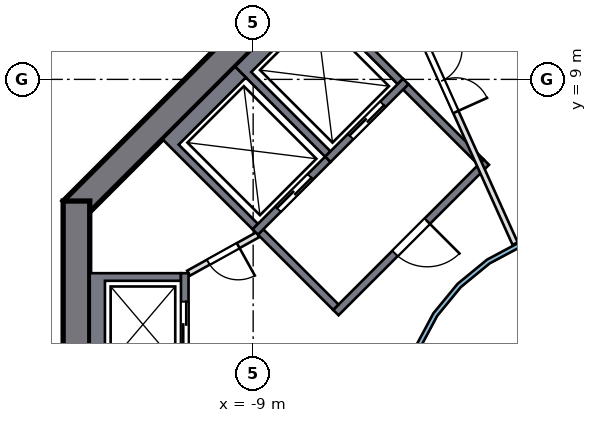
"""IFC4 building model, lengths in metres.
Left out: names, types, materials, properties, quantities, classifications, styles, units other than length and angle.
Written with IfcOpenShell. Run it as: python <this file> out.ifc"""

import sys

from ifc_helpers import new_model, si_unit, direction, frame, frame_2d, origin, place, context, subcontext, project, spatial, polyline, rectangle, outline, extrude, element, fill, save


model = new_model("IFC4")
c1 = context("Model", 3, precision=1e-05, world=origin(), true_north=direction((0.0, 1.0)))
c2 = subcontext(c1, "Body", "Model", "MODEL_VIEW")
j1 = project(units=[si_unit("LENGTHUNIT", "METRE"), si_unit("PLANEANGLEUNIT", "RADIAN")], contexts=[c1])
p1 = place(None, origin())
s1 = spatial("IfcSite", under=j1, at=p1, CompositionType="ELEMENT")
p2 = place(p1, origin())
s2 = spatial("IfcBuilding", under=s1, at=p2, CompositionType="ELEMENT")
p3 = place(p2, frame((0.0, 0.0, 154.0)))
s3 = spatial("IfcBuildingStorey", under=s2, at=p3, CompositionType="ELEMENT", Elevation=154.0)
p4 = place(p3, frame((-5.552, 13.752, 0.0), z_axis=(0.0, 0.0, 1.0), x_axis=(-0.707106781, -0.707106781, 0.0)))
e1 = element("IfcWall", 1, at=p4, inside=s3, PredefinedType="SHEAR", context=c2, shape_type="SweptSolid", body=[
    extrude(rectangle(XDim=11.598, YDim=0.7, at=frame_2d((5.799, 0.0))), origin(), (0.0, 0.0, 1.0), 4.5),
])
p5 = place(p3, frame((-13.65, 5.799, 0.0), z_axis=(0.0, 0.0, 1.0), x_axis=(0.0, -1.0, 0.0)))
e2 = element("IfcWall", 2, at=p5, inside=s3, PredefinedType="SHEAR", context=c2, shape_type="SweptSolid", body=[
    extrude(rectangle(XDim=11.598, YDim=0.7, at=frame_2d((5.799, 0.0))), origin(), (0.0, 0.0, 1.0), 4.5),
])
p6 = place(p5, frame((4.899, 0.0, 0.0)))
e3 = element("IfcOpeningElement", 3, at=p6, cuts=e2, PredefinedType="OPENING", context=c2, shape_type="SweptSolid", body=[
    extrude(rectangle(XDim=1.8, YDim=2.1, at=frame_2d((0.9, 1.05))), frame((0.0, 0.36, 0.0), z_axis=(0.0, -1.0, 0.0), x_axis=(1.0, 0.0, 0.0)), (0.0, 0.0, 1.0), 0.72),
])
p7 = place(p3, origin())
e4 = element("IfcWall", 4, at=p7, inside=s3, PredefinedType="SOLIDWALL", context=c2, shape_type="SweptSolid", body=[
    extrude(outline(polyline([(-13.3, 3.9), (-10.9, 3.9), (-10.9, 3.7), (-12.9, 3.7), (-12.9, 1.4), (-10.9, 1.4), (-10.9, 1.2), (-13.3, 1.2), (-13.3, 3.9)])), origin(), (0.0, 0.0, 1.0), 4.19),
])
p8 = place(p3, frame((-10.8, 1.2, 0.0), z_axis=(0.0, 0.0, 1.0), x_axis=(0.0, 1.0, 0.0)))
e5 = element("IfcWall", 5, at=p8, inside=s3, PredefinedType="SOLIDWALL", context=c2, shape_type="SweptSolid", body=[
    extrude(rectangle(XDim=2.7, YDim=0.2, at=frame_2d((1.35, 0.0))), origin(), (0.0, 0.0, 1.0), 4.19),
])
p9 = place(p8, frame((0.75, 0.0, 0.0)))
e6 = element("IfcOpeningElement", 6, at=p9, cuts=e5, PredefinedType="OPENING", context=c2, shape_type="SweptSolid", body=[
    extrude(rectangle(XDim=1.2, YDim=2.1, at=frame_2d((0.6, 1.05))), frame((0.0, 0.11, 0.0), z_axis=(0.0, -1.0, 0.0), x_axis=(1.0, 0.0, 0.0)), (0.0, 0.0, 1.0), 0.22),
])
p10 = place(p3, origin())
e7 = element("IfcWall", 7, at=p10, inside=s3, PredefinedType="SOLIDWALL", context=c2, shape_type="SweptSolid", body=[
    extrude(outline(polyline([(-9.475, 9.334), (-7.425, 11.385), (-5.056, 9.016), (-5.197, 8.874), (-7.283, 10.96), (-9.051, 9.192), (-6.965, 7.106), (-7.106, 6.965), (-9.475, 9.334)])), origin(), (0.0, 0.0, 1.0), 4.19),
])
p11 = place(p3, frame((-4.985, 8.945, 0.0), z_axis=(0.0, 0.0, 1.0), x_axis=(-0.707106781, -0.707106781, 0.0)))
e8 = element("IfcWall", 8, at=p11, inside=s3, PredefinedType="SOLIDWALL", context=c2, shape_type="SweptSolid", body=[
    extrude(rectangle(XDim=2.9, YDim=0.2, at=frame_2d((1.45, 0.0))), origin(), (0.0, 0.0, 1.0), 4.19),
])
p12 = place(p11, frame((0.85, 0.0, 0.0)))
e9 = element("IfcOpeningElement", 9, at=p12, cuts=e8, PredefinedType="OPENING", context=c2, shape_type="SweptSolid", body=[
    extrude(rectangle(XDim=1.2, YDim=2.1, at=frame_2d((0.6, 1.05))), frame((0.0, 0.11, 0.0), z_axis=(0.0, -1.0, 0.0), x_axis=(1.0, 0.0, 0.0)), (0.0, 0.0, 1.0), 0.22),
])
p13 = place(p3, origin())
e10 = element("IfcWall", 10, at=p13, inside=s3, PredefinedType="SOLIDWALL", context=c2, shape_type="SweptSolid", body=[
    extrude(outline(polyline([(-11.385, 7.425), (-9.475, 9.334), (-9.192, 9.051), (-10.96, 7.283), (-8.874, 5.197), (-9.016, 5.056), (-11.385, 7.425)])), origin(), (0.0, 0.0, 1.0), 4.19),
])
p14 = place(p3, frame((-7.036, 6.894, 0.0), z_axis=(0.0, 0.0, 1.0), x_axis=(-0.707106781, -0.707106781, 0.0)))
e11 = element("IfcWall", 11, at=p14, inside=s3, PredefinedType="SOLIDWALL", context=c2, shape_type="SweptSolid", body=[
    extrude(rectangle(XDim=2.7, YDim=0.2, at=frame_2d((1.35, 0.0))), origin(), (0.0, 0.0, 1.0), 4.19),
])
p15 = place(p14, frame((0.65, 0.0, 0.0)))
e12 = element("IfcOpeningElement", 12, at=p15, cuts=e11, PredefinedType="OPENING", context=c2, shape_type="SweptSolid", body=[
    extrude(rectangle(XDim=1.2, YDim=2.1, at=frame_2d((0.6, 1.05))), frame((0.0, 0.11, 0.0), z_axis=(0.0, -1.0, 0.0), x_axis=(1.0, 0.0, 0.0)), (0.0, 0.0, 1.0), 0.22),
])
p16 = place(p3, frame((-2.864, 6.823, 0.0), z_axis=(0.0, 0.0, 1.0), x_axis=(-0.707106781, -0.707106781, 0.0)))
e13 = element("IfcWall", 13, at=p16, inside=s3, PredefinedType="SOLIDWALL", context=c2, shape_type="SweptSolid", body=[
    extrude(rectangle(XDim=5.6, YDim=0.2, at=frame_2d((2.8, 0.0))), origin(), (0.0, 0.0, 1.0), 4.19),
])
p17 = place(p16, frame((2.2, 0.0, 0.0)))
e14 = element("IfcOpeningElement", 14, at=p17, cuts=e13, PredefinedType="OPENING", context=c2, shape_type="SweptSolid", body=[
    extrude(rectangle(XDim=1.2, YDim=2.1, at=frame_2d((0.6, 1.05))), frame((0.0, 0.11, 0.0), z_axis=(0.0, -1.0, 0.0), x_axis=(1.0, 0.0, 0.0)), (0.0, 0.0, 1.0), 0.22),
])
for number, where, z_axis, x_axis in (
    (15, (-3.005, 6.823, 0.0), (0.0, 0.0, 1.0), (-0.707, 0.707, 0.0)),
    (16, (-6.823, 3.005, 0.0), (0.0, 0.0, 1.0), (-0.707, 0.707, 0.0)),
):
    element("IfcWall", number, at=place(p3, frame(where, z_axis=z_axis, x_axis=x_axis)), inside=s3, PredefinedType="SOLIDWALL", context=c2, shape_type="SweptSolid", body=[
        extrude(rectangle(XDim=2.8, YDim=0.2, at=frame_2d((1.4, 0.0))), origin(), (0.0, 0.0, 1.0), 4.19),
    ])
p18 = place(p3, frame((-8.874, 4.914, 0.0), z_axis=(0.0, 0.0, 1.0), x_axis=(-0.874129705, -0.485692555, 0.0)))
e17 = element("IfcWall", 17, at=p18, inside=s3, PredefinedType="PARTITIONING", context=c2, shape_type="SweptSolid", body=[
    extrude(rectangle(XDim=2.089, YDim=0.15, at=frame_2d((1.044, 0.0))), origin(), (0.0, 0.0, 1.0), 4.19),
])
p19 = place(p18, frame((0.594, 0.0, 0.0)))
e18 = element("IfcOpeningElement", 18, at=p19, cuts=e17, PredefinedType="OPENING", context=c2, shape_type="SweptSolid", body=[
    extrude(rectangle(XDim=0.9, YDim=2.1, at=frame_2d((0.45, 1.05))), frame((0.0, 0.085, 0.0), z_axis=(0.0, -1.0, 0.0), x_axis=(1.0, 0.0, 0.0)), (0.0, 0.0, 1.0), 0.17),
])
p20 = place(p3, frame((-5.828, 12.942, 0.0), z_axis=(0.0, 0.0, 1.0), x_axis=(0.410577476, -0.911825716, 0.0)))
e19 = element("IfcWall", 19, at=p20, inside=s3, PredefinedType="PARTITIONING", context=c2, shape_type="SweptSolid", body=[
    extrude(rectangle(XDim=9.063, YDim=0.15, at=frame_2d((4.532, 0.0))), origin(), (0.0, 0.0, 1.0), 4.19),
])
p21 = place(p20, frame((3.463, 0.0, 0.0)))
e20 = element("IfcOpeningElement", 20, at=p21, cuts=e19, PredefinedType="OPENING", context=c2, shape_type="SweptSolid", body=[
    extrude(rectangle(XDim=1.8, YDim=2.1, at=frame_2d((0.9, 1.05))), frame((0.0, 0.085, 0.0), z_axis=(0.0, -1.0, 0.0), x_axis=(1.0, 0.0, 0.0)), (0.0, 0.0, 1.0), 0.17),
])
p22 = place(p3, origin())
e21 = element("IfcWall", 21, at=p22, inside=s3, PredefinedType="SOLIDWALL", context=c2, shape_type="SweptSolid", body=[
    extrude(outline(polyline([(5.021, -0.999), (4.73, -1.959), (4.257, -2.844), (3.62, -3.62), (2.844, -4.257), (1.959, -4.73), (0.999, -5.021), (0.0, -5.12), (-0.999, -5.021), (-1.959, -4.73), (-2.844, -4.257), (-3.62, -3.62), (-4.257, -2.844), (-4.73, -1.959), (-5.021, -0.999), (-5.12, 0.0), (-5.021, 0.999), (-4.73, 1.959), (-4.257, 2.844), (-3.62, 3.62), (-2.844, 4.257), (-1.959, 4.73), (-0.999, 5.021), (0.0, 5.12), (0.999, 5.021), (1.959, 4.73), (2.844, 4.257), (3.62, 3.62), (4.257, 2.844), (4.73, 1.959), (5.021, 0.999), (5.12, 0.0), (5.021, -0.999)]), holes=[polyline([(4.904, 0.976), (4.619, 1.913), (4.157, 2.778), (3.535, 3.535), (2.778, 4.157), (1.913, 4.619), (0.976, 4.904), (0.0, 5.0), (-0.976, 4.904), (-1.913, 4.619), (-2.778, 4.157), (-3.535, 3.535), (-4.157, 2.778), (-4.619, 1.913), (-4.904, 0.976), (-5.0, 0.0), (-4.904, -0.976), (-4.619, -1.913), (-4.157, -2.778), (-3.535, -3.535), (-2.778, -4.157), (-1.913, -4.619), (-0.976, -4.904), (0.0, -5.0), (0.976, -4.904), (1.913, -4.619), (2.778, -4.157), (3.535, -3.535), (4.157, -2.778), (4.619, -1.913), (4.904, -0.976), (5.0, 0.0), (4.904, 0.976)])]), origin(), (0.0, 0.0, 1.0), 4.19),
])
p23 = place(p3, frame((-17.738, 4.833, 0.0), z_axis=(0.0, 0.0, 1.0), x_axis=(0.503629868, 0.863919531, 0.0)))
e22 = element("IfcWall", 22, at=p23, inside=s3, PredefinedType="SOLIDWALL", context=c2, shape_type="SweptSolid", body=[
    extrude(rectangle(XDim=9.317, YDim=0.2, at=frame_2d((4.658, 0.0))), origin(), (0.0, 0.0, 1.0), 4.19),
])
p24 = place(p23, frame((5.15, 0.0, 0.0)))
e23 = element("IfcOpeningElement", 23, at=p24, cuts=e22, PredefinedType="OPENING", context=c2, shape_type="SweptSolid", body=[
    extrude(rectangle(XDim=1.0, YDim=2.1, at=frame_2d((0.5, 1.05))), frame((0.0, 0.11, 0.0), z_axis=(0.0, -1.0, 0.0), x_axis=(1.0, 0.0, 0.0)), (0.0, 0.0, 1.0), 0.22),
])
p25 = place(p9, origin())
e24 = element("IfcDoor", 24, at=p25, inside=s3, OperationType="DOUBLE_DOOR_SLIDING", PredefinedType="DOOR", context=c2, shape_type="SweptSolid", body=[
    extrude(rectangle(XDim=1.2, YDim=2.1, at=frame_2d((0.6, 1.05))), frame((0.0, 0.025, 0.0), z_axis=(0.0, -1.0, 0.0), x_axis=(1.0, 0.0, 0.0)), (0.0, 0.0, 1.0), 0.05),
])
fill(e6, e24)
p26 = place(p12, origin())
e25 = element("IfcDoor", 25, at=p26, inside=s3, OperationType="DOUBLE_DOOR_SLIDING", PredefinedType="DOOR", context=c2, shape_type="SweptSolid", body=[
    extrude(rectangle(XDim=1.2, YDim=2.1, at=frame_2d((0.6, 1.05))), frame((0.0, 0.025, 0.0), z_axis=(0.0, -1.0, 0.0), x_axis=(1.0, 0.0, 0.0)), (0.0, 0.0, 1.0), 0.05),
])
fill(e9, e25)
p27 = place(p15, origin())
e26 = element("IfcDoor", 26, at=p27, inside=s3, OperationType="DOUBLE_DOOR_SLIDING", PredefinedType="DOOR", context=c2, shape_type="SweptSolid", body=[
    extrude(rectangle(XDim=1.2, YDim=2.1, at=frame_2d((0.6, 1.05))), frame((0.0, 0.025, 0.0), z_axis=(0.0, -1.0, 0.0), x_axis=(1.0, 0.0, 0.0)), (0.0, 0.0, 1.0), 0.05),
])
fill(e12, e26)
p28 = place(p17, origin())
e27 = element("IfcDoor", 27, at=p28, inside=s3, OperationType="SINGLE_SWING_LEFT", PredefinedType="DOOR", context=c2, shape_type="SweptSolid", body=[
    extrude(rectangle(XDim=1.2, YDim=2.1, at=frame_2d((0.6, 1.05))), frame((0.0, 0.025, 0.0), z_axis=(0.0, -1.0, 0.0), x_axis=(1.0, 0.0, 0.0)), (0.0, 0.0, 1.0), 0.05),
])
fill(e14, e27)
p29 = place(p19, origin())
e28 = element("IfcDoor", 28, at=p29, inside=s3, OperationType="SINGLE_SWING_LEFT", PredefinedType="DOOR", context=c2, shape_type="SweptSolid", body=[
    extrude(rectangle(XDim=0.9, YDim=2.1, at=frame_2d((0.45, 1.05))), frame((0.0, 0.025, 0.0), z_axis=(0.0, -1.0, 0.0), x_axis=(1.0, 0.0, 0.0)), (0.0, 0.0, 1.0), 0.05),
])
fill(e18, e28)
p30 = place(p21, origin())
e29 = element("IfcDoor", 29, at=p30, inside=s3, OperationType="DOUBLE_DOOR_SINGLE_SWING", PredefinedType="DOOR", context=c2, shape_type="SweptSolid", body=[
    extrude(rectangle(XDim=1.8, YDim=2.1, at=frame_2d((0.9, 1.05))), frame((0.0, 0.025, 0.0), z_axis=(0.0, -1.0, 0.0), x_axis=(1.0, 0.0, 0.0)), (0.0, 0.0, 1.0), 0.05),
])
fill(e20, e29)
save(model, sys.argv[1])
